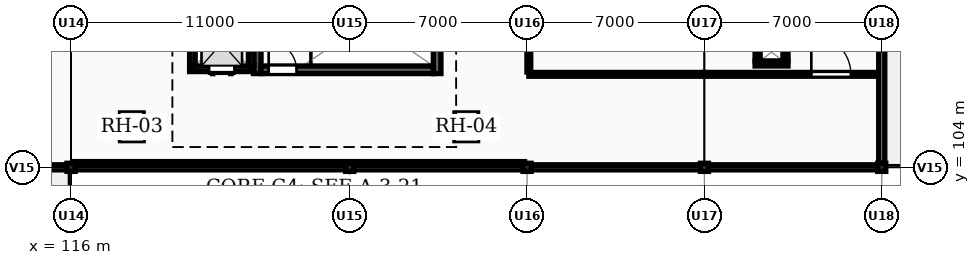
"""IFC4 building model, lengths in metres.
Left out: names, types, materials, properties, quantities, classifications, styles, units other than length and angle.
Written with IfcOpenShell. Run it as: python <this file> out.ifc"""

import sys

from ifc_helpers import new_model, si_unit, direction, frame, frame_2d, origin, origin_2d, place, context, subcontext, project, spatial, rectangle, extrude, element, fill, save


model = new_model("IFC4")
c1 = context("Model", 3, precision=1e-05, world=origin(), true_north=direction((0.0, 1.0)))
c2 = subcontext(c1, "Body", "Model", "MODEL_VIEW")
j1 = project(units=[si_unit("LENGTHUNIT", "METRE"), si_unit("PLANEANGLEUNIT", "RADIAN")], contexts=[c1])
p1 = place(None, origin())
s1 = spatial("IfcSite", under=j1, at=p1, CompositionType="ELEMENT")
p2 = place(p1, origin())
s2 = spatial("IfcBuilding", under=s1, at=p2, CompositionType="ELEMENT")
p3 = place(p2, frame((0.0, 0.0, 16.2)))
s3 = spatial("IfcBuildingStorey", under=s2, at=p3, CompositionType="ELEMENT", Elevation=16.2)
for number, where, z_axis, x_axis in (
    (1, (116.0, 104.0, 0.0), (0.0, 0.0, 1.0), (1.0, 0.0, 0.0)),
    (2, (127.0, 104.0, 0.0), (0.0, 0.0, 1.0), (1.0, 0.0, 0.0)),
):
    element("IfcColumn", number, at=place(p3, frame(where, z_axis=z_axis, x_axis=x_axis)), inside=s3, PredefinedType="COLUMN", context=c2, shape_type="SweptSolid", body=[
        extrude(rectangle(XDim=0.32, YDim=0.32, at=origin_2d()), origin(), (0.0, 0.0, 1.0), 3.9),
    ])
p4 = place(p3, frame((134.0, 104.0, 0.0), z_axis=(0.0, 0.0, 1.0), x_axis=(1.0, 0.0, 0.0)))
e3 = element("IfcColumn", 3, at=p4, inside=s3, PredefinedType="COLUMN", context=c2, shape_type="SweptSolid", body=[
    extrude(rectangle(XDim=0.32, YDim=0.32, at=origin_2d()), origin(), (0.0, 0.0, 1.0), 4.03),
])
p5 = place(p3, frame((141.0, 104.0, 0.0), z_axis=(0.0, 0.0, 1.0), x_axis=(1.0, 0.0, 0.0)))
e4 = element("IfcColumn", 4, at=p5, inside=s3, PredefinedType="COLUMN", context=c2, shape_type="SweptSolid", body=[
    extrude(rectangle(XDim=0.32, YDim=0.32, at=origin_2d()), origin(), (0.0, 0.0, 1.0), 4.175),
])
p6 = place(p3, frame((148.0, 104.0, 0.0), z_axis=(0.0, 0.0, 1.0), x_axis=(1.0, 0.0, 0.0)))
e5 = element("IfcColumn", 5, at=p6, inside=s3, PredefinedType="COLUMN", context=c2, shape_type="SweptSolid", body=[
    extrude(rectangle(XDim=0.32, YDim=0.32, at=origin_2d()), origin(), (0.0, 0.0, 1.0), 4.32),
])
p7 = place(p3, frame((115.84, 104.0, 0.0), z_axis=(0.0, 0.0, 1.0), x_axis=(-1.0, 0.0, 0.0)))
e6 = element("IfcWall", 6, at=p7, inside=s3, PredefinedType="SOLIDWALL", context=c2, shape_type="SweptSolid", body=[
    extrude(rectangle(XDim=8.68, YDim=0.2, at=frame_2d((4.34, 0.0))), origin(), (0.0, 0.0, 1.0), 0.95),
])
p8 = place(p3, frame((148.0, 111.84, 0.0), z_axis=(0.0, 0.0, 1.0), x_axis=(0.0, -1.0, 0.0)))
e7 = element("IfcWall", 7, at=p8, inside=s3, PredefinedType="SOLIDWALL", context=c2, shape_type="SweptSolid", body=[
    extrude(rectangle(XDim=7.68, YDim=0.24, at=frame_2d((3.84, 0.0))), origin(), (0.0, 0.0, 1.0), 4.32),
])
p9 = place(p8, frame((1.5, 0.0, 0.0)))
e8 = element("IfcOpeningElement", 8, at=p9, cuts=e7, PredefinedType="OPENING", context=c2, shape_type="SweptSolid", body=[
    extrude(rectangle(XDim=1.5, YDim=2.15, at=frame_2d((0.75, 1.075))), frame((0.0, 0.13, 0.0), z_axis=(0.0, -1.0, 0.0), x_axis=(1.0, 0.0, 0.0)), (0.0, 0.0, 1.0), 0.26),
])
for number, where, z_axis, x_axis in (
    (9, (147.84, 104.0, 0.0), (0.0, 0.0, 1.0), (-1.0, 0.0, 0.0)),
    (10, (140.84, 104.0, 0.0), (0.0, 0.0, 1.0), (-1.0, 0.0, 0.0)),
    (11, (133.84, 104.0, 0.0), (0.0, 0.0, 1.0), (-1.0, 0.0, 0.0)),
):
    element("IfcWall", number, at=place(p3, frame(where, z_axis=z_axis, x_axis=x_axis)), inside=s3, PredefinedType="SOLIDWALL", context=c2, shape_type="SweptSolid", body=[
        extrude(rectangle(XDim=6.68, YDim=0.2, at=frame_2d((3.34, 0.0))), origin(), (0.0, 0.0, 1.0), 0.95),
    ])
p10 = place(p3, frame((126.84, 104.0, 0.0), z_axis=(0.0, 0.0, 1.0), x_axis=(-1.0, 0.0, 0.0)))
e12 = element("IfcWall", 12, at=p10, inside=s3, PredefinedType="SOLIDWALL", context=c2, shape_type="SweptSolid", body=[
    extrude(rectangle(XDim=10.68, YDim=0.2, at=frame_2d((5.34, 0.0))), origin(), (0.0, 0.0, 1.0), 0.95),
])
p11 = place(p3, frame((116.1, 104.15, 3.9), z_axis=(0.0, 0.0, 1.0), x_axis=(1.0, 0.0, 0.0)))
e13 = element("IfcWall", 13, at=p11, inside=s3, PredefinedType="PARAPET", context=c2, shape_type="SweptSolid", body=[
    extrude(rectangle(XDim=17.8, YDim=0.15, at=frame_2d((8.9, 0.0))), origin(), (0.0, 0.0, 1.0), 0.95),
])
for number, where, z_axis, x_axis in (
    (14, (123.35, 107.7, 0.0), (0.0, 0.0, 1.0), (0.0, 1.0, 0.0)),
    (15, (130.45, 111.8, 0.0), (0.0, 0.0, 1.0), (0.0, -1.0, 0.0)),
):
    element("IfcWall", number, at=place(p3, frame(where, z_axis=z_axis, x_axis=x_axis)), inside=s3, PredefinedType="SHEAR", context=c2, shape_type="SweptSolid", body=[
        extrude(rectangle(XDim=4.1, YDim=0.3, at=frame_2d((2.05, 0.0))), origin(), (0.0, 0.0, 1.0), 3.9),
    ])
p12 = place(p3, frame((123.5, 107.85, 0.0), z_axis=(0.0, 0.0, 1.0), x_axis=(1.0, 0.0, 0.0)))
e16 = element("IfcWall", 16, at=p12, inside=s3, PredefinedType="SHEAR", context=c2, shape_type="SweptSolid", body=[
    extrude(rectangle(XDim=6.8, YDim=0.3, at=frame_2d((3.4, 0.0))), origin(), (0.0, 0.0, 1.0), 3.9),
])
p13 = place(p12, frame((0.3, 0.0, 0.0)))
e17 = element("IfcOpeningElement", 17, at=p13, cuts=e16, PredefinedType="OPENING", context=c2, shape_type="SweptSolid", body=[
    extrude(rectangle(XDim=1.1, YDim=2.15, at=frame_2d((0.55, 1.075))), frame((0.0, 0.16, 0.0), z_axis=(0.0, -1.0, 0.0), x_axis=(1.0, 0.0, 0.0)), (0.0, 0.0, 1.0), 0.32),
])
p14 = place(p3, frame((123.22, 107.89, 0.0), z_axis=(0.0, 0.0, 1.0), x_axis=(-1.0, 0.0, 0.0)))
e18 = element("IfcWall", 18, at=p14, inside=s3, PredefinedType="SHEAR", context=c2, shape_type="SweptSolid", body=[
    extrude(rectangle(XDim=2.54, YDim=0.22, at=frame_2d((1.27, 0.0))), origin(), (0.0, 0.0, 1.0), 4.5),
])
p15 = place(p14, frame((0.77, 0.0, 0.0)))
e19 = element("IfcOpeningElement", 19, at=p15, cuts=e18, PredefinedType="OPENING", context=c2, shape_type="SweptSolid", body=[
    extrude(rectangle(XDim=1.0, YDim=2.15, at=frame_2d((0.5, 1.075))), frame((0.0, 0.12, 0.0), z_axis=(0.0, -1.0, 0.0), x_axis=(1.0, 0.0, 0.0)), (0.0, 0.0, 1.0), 0.24),
])
for number, where, z_axis, x_axis in (
    (20, (120.79, 108.0, 0.0), (0.0, 0.0, 1.0), (0.0, 1.0, 0.0)),
    (21, (123.11, 110.3, 0.0), (0.0, 0.0, 1.0), (0.0, -1.0, 0.0)),
):
    element("IfcWall", number, at=place(p3, frame(where, z_axis=z_axis, x_axis=x_axis)), inside=s3, PredefinedType="SHEAR", context=c2, shape_type="SweptSolid", body=[
        extrude(rectangle(XDim=2.3, YDim=0.22, at=frame_2d((1.15, 0.0))), origin(), (0.0, 0.0, 1.0), 4.5),
    ])
p16 = place(p3, frame((144.3, 108.1, 0.0), z_axis=(0.0, 0.0, 1.0), x_axis=(-1.0, 0.0, 0.0)))
e22 = element("IfcWall", 22, at=p16, inside=s3, PredefinedType="PARTITIONING", context=c2, shape_type="SweptSolid", body=[
    extrude(rectangle(XDim=1.3, YDim=0.2, at=frame_2d((0.65, 0.0))), origin(), (0.0, 0.0, 1.0), 3.65),
])
for number, where, z_axis, x_axis in (
    (23, (143.1, 108.2, 0.0), (0.0, 0.0, 1.0), (0.0, 1.0, 0.0)),
    (24, (144.2, 108.9, 0.0), (0.0, 0.0, 1.0), (0.0, -1.0, 0.0)),
):
    element("IfcWall", number, at=place(p3, frame(where, z_axis=z_axis, x_axis=x_axis)), inside=s3, PredefinedType="PARTITIONING", context=c2, shape_type="SweptSolid", body=[
        extrude(rectangle(XDim=0.7, YDim=0.2, at=frame_2d((0.35, 0.0))), origin(), (0.0, 0.0, 1.0), 3.65),
    ])
p17 = place(p3, frame((134.07, 107.67, 0.0), z_axis=(0.0, 0.0, 1.0), x_axis=(1.0, 0.0, 0.0)))
e25 = element("IfcWall", 25, at=p17, inside=s3, PredefinedType="PARTITIONING", context=c2, shape_type="SweptSolid", body=[
    extrude(rectangle(XDim=6.93, YDim=0.15, at=frame_2d((3.465, 0.0))), origin(), (0.0, 0.0, 1.0), 3.64),
])
p18 = place(p3, frame((141.0, 107.67, 0.0), z_axis=(0.0, 0.0, 1.0), x_axis=(1.0, 0.0, 0.0)))
e26 = element("IfcWall", 26, at=p18, inside=s3, PredefinedType="PARTITIONING", context=c2, shape_type="SweptSolid", body=[
    extrude(rectangle(XDim=6.838, YDim=0.15, at=frame_2d((3.419, 0.0))), origin(), (0.0, 0.0, 1.0), 3.64),
])
p19 = place(p18, frame((4.22, 0.0, 0.0)))
e27 = element("IfcOpeningElement", 27, at=p19, cuts=e26, PredefinedType="OPENING", context=c2, shape_type="SweptSolid", body=[
    extrude(rectangle(XDim=1.56, YDim=2.25, at=frame_2d((0.78, 1.125))), frame((0.0, 0.085, 0.0), z_axis=(0.0, -1.0, 0.0), x_axis=(1.0, 0.0, 0.0)), (0.0, 0.0, 1.0), 0.17),
])
p20 = place(p3, frame((134.07, 107.76, 0.0), z_axis=(0.0, 0.0, 1.0), x_axis=(0.0, 1.0, 0.0)))
e28 = element("IfcWall", 28, at=p20, inside=s3, PredefinedType="PARTITIONING", context=c2, shape_type="SweptSolid", body=[
    extrude(rectangle(XDim=4.57, YDim=0.15, at=frame_2d((2.285, 0.0))), origin(), (0.0, 0.0, 1.0), 3.64),
])
p21 = place(p2, frame((0.0, 0.0, 24.0)))
p22 = place(p21, frame((0.0, 0.0, -4.146)))
p23 = place(p22, frame((118.4, 105.6, 0.0)))
p24 = place(p23, frame((0.0, 0.0, 0.196)))
e29 = element("IfcDoor", 29, at=p24, inside=s3, OperationType="SINGLE_SWING_LEFT", PredefinedType="TRAPDOOR", context=c2, shape_type="SweptSolid", body=[
    extrude(rectangle(XDim=1.0, YDim=1.2, at=origin_2d()), origin(), (0.0, 0.0, 1.0), 0.05),
])
p25 = place(p22, frame((131.6, 105.6, 0.0)))
p26 = place(p25, frame((0.0, 0.0, 0.196)))
e30 = element("IfcDoor", 30, at=p26, inside=s3, OperationType="SINGLE_SWING_LEFT", PredefinedType="TRAPDOOR", context=c2, shape_type="SweptSolid", body=[
    extrude(rectangle(XDim=1.0, YDim=1.2, at=origin_2d()), origin(), (0.0, 0.0, 1.0), 0.05),
])
p27 = place(p13, origin())
e31 = element("IfcDoor", 31, at=p27, inside=s3, OperationType="SINGLE_SWING_LEFT", PredefinedType="DOOR", context=c2, shape_type="SweptSolid", body=[
    extrude(rectangle(XDim=1.1, YDim=2.15, at=frame_2d((0.55, 1.075))), frame((0.0, 0.025, 0.0), z_axis=(0.0, -1.0, 0.0), x_axis=(1.0, 0.0, 0.0)), (0.0, 0.0, 1.0), 0.05),
])
fill(e17, e31)
p28 = place(p15, origin())
e32 = element("IfcDoor", 32, at=p28, inside=s3, OperationType="DOUBLE_DOOR_SLIDING", PredefinedType="DOOR", context=c2, shape_type="SweptSolid", body=[
    extrude(rectangle(XDim=1.0, YDim=2.15, at=frame_2d((0.5, 1.075))), frame((0.0, 0.025, 0.0), z_axis=(0.0, -1.0, 0.0), x_axis=(1.0, 0.0, 0.0)), (0.0, 0.0, 1.0), 0.05),
])
fill(e19, e32)
p29 = place(p19, origin())
e33 = element("IfcDoor", 33, at=p29, inside=s3, OperationType="SINGLE_SWING_LEFT", PredefinedType="DOOR", context=c2, shape_type="SweptSolid", body=[
    extrude(rectangle(XDim=1.56, YDim=2.25, at=frame_2d((0.78, 1.125))), frame((0.0, 0.025, 0.0), z_axis=(0.0, -1.0, 0.0), x_axis=(1.0, 0.0, 0.0)), (0.0, 0.0, 1.0), 0.05),
])
fill(e27, e33)
save(model, sys.argv[1])
